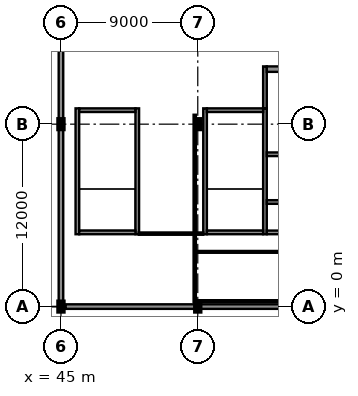
"""IFC4 building model, lengths in metres.
Left out: names, types, materials, properties, quantities, classifications, styles, units other than length and angle.
Written with IfcOpenShell. Run it as: python <this file> out.ifc"""

import sys

from ifc_helpers import new_model, si_unit, direction, frame, frame_2d, origin, origin_2d, place, context, subcontext, project, spatial, rectangle, i_section, extrude, element, fill, save


model = new_model("IFC4")
c1 = context("Model", 3, precision=1e-05, world=origin(), true_north=direction((0.0, 1.0)))
c2 = subcontext(c1, "Body", "Model", "MODEL_VIEW")
j1 = project(units=[si_unit("LENGTHUNIT", "METRE"), si_unit("PLANEANGLEUNIT", "RADIAN")], contexts=[c1])
p1 = place(None, origin())
s1 = spatial("IfcSite", under=j1, at=p1, CompositionType="ELEMENT")
p2 = place(p1, origin())
s2 = spatial("IfcBuilding", under=s1, at=p2, CompositionType="ELEMENT")
p3 = place(p2, frame((0.0, 0.0, 14.4)))
s3 = spatial("IfcBuildingStorey", under=s2, at=p3, CompositionType="ELEMENT", Elevation=14.4)
for number, where, z_axis, x_axis in (
    (1, (45.0, 0.0, 0.0), (0.0, 0.0, 1.0), (0.0, 1.0, 0.0)),
    (2, (45.0, 12.0, 0.0), (0.0, 0.0, 1.0), (1.0, 0.0, 0.0)),
    (3, (54.0, 0.0, 0.0), (0.0, 0.0, 1.0), (1.0, 0.0, 0.0)),
    (4, (54.0, 12.0, 0.0), (0.0, 0.0, 1.0), (1.0, 0.0, 0.0)),
):
    element("IfcColumn", number, at=place(p3, frame(where, z_axis=z_axis, x_axis=x_axis)), inside=s3, PredefinedType="COLUMN", context=c2, shape_type="SweptSolid", body=[
        extrude(i_section(OverallWidth=0.305, OverallDepth=0.62, WebThickness=0.021, FlangeThickness=0.04, at=origin_2d()), origin(), (0.0, 0.0, 1.0), 4.5),
    ])
p4 = place(p3, frame((45.308, 0.0, 0.0), z_axis=(0.0, 0.0, 1.0), x_axis=(1.0, 0.0, 0.0)))
e5 = element("IfcWall", 5, at=p4, inside=s3, PredefinedType="SOLIDWALL", context=c2, shape_type="SweptSolid", body=[
    extrude(rectangle(XDim=8.684, YDim=0.3, at=frame_2d((4.342, 0.0))), origin(), (0.0, 0.0, 1.0), 3.675),
])
p5 = place(p4, frame((1.432, 0.0, 0.85)))
e6 = element("IfcOpeningElement", 6, at=p5, cuts=e5, PredefinedType="OPENING", context=c2, shape_type="SweptSolid", body=[
    extrude(rectangle(XDim=2.0, YDim=2.0, at=frame_2d((1.0, 1.0))), frame((0.0, 0.165, 0.0), z_axis=(0.0, -1.0, 0.0), x_axis=(1.0, 0.0, 0.0)), (0.0, 0.0, 1.0), 0.33),
])
p6 = place(p4, frame((5.252, 0.0, 0.85)))
e7 = element("IfcOpeningElement", 7, at=p6, cuts=e5, PredefinedType="OPENING", context=c2, shape_type="SweptSolid", body=[
    extrude(rectangle(XDim=2.0, YDim=2.0, at=frame_2d((1.0, 1.0))), frame((0.0, 0.165, 0.0), z_axis=(0.0, -1.0, 0.0), x_axis=(1.0, 0.0, 0.0)), (0.0, 0.0, 1.0), 0.33),
])
p7 = place(p3, frame((54.008, 0.0, 0.0), z_axis=(0.0, 0.0, 1.0), x_axis=(1.0, 0.0, 0.0)))
e8 = element("IfcWall", 8, at=p7, inside=s3, PredefinedType="SOLIDWALL", context=c2, shape_type="SweptSolid", body=[
    extrude(rectangle(XDim=8.984, YDim=0.3, at=frame_2d((4.492, 0.0))), origin(), (0.0, 0.0, 1.0), 3.675),
])
p8 = place(p7, frame((1.516, 0.0, 0.85)))
e9 = element("IfcOpeningElement", 9, at=p8, cuts=e8, PredefinedType="OPENING", context=c2, shape_type="SweptSolid", body=[
    extrude(rectangle(XDim=2.0, YDim=2.0, at=frame_2d((1.0, 1.0))), frame((0.0, 0.165, 0.0), z_axis=(0.0, -1.0, 0.0), x_axis=(1.0, 0.0, 0.0)), (0.0, 0.0, 1.0), 0.33),
])
p9 = place(p7, frame((5.468, 0.0, 0.85)))
e10 = element("IfcOpeningElement", 10, at=p9, cuts=e8, PredefinedType="OPENING", context=c2, shape_type="SweptSolid", body=[
    extrude(rectangle(XDim=2.0, YDim=2.0, at=frame_2d((1.0, 1.0))), frame((0.0, 0.165, 0.0), z_axis=(0.0, -1.0, 0.0), x_axis=(1.0, 0.0, 0.0)), (0.0, 0.0, 1.0), 0.33),
])
p10 = place(p3, frame((45.0, 23.644, 0.0), z_axis=(0.0, 0.0, 1.0), x_axis=(0.0, -1.0, 0.0)))
e11 = element("IfcWall", 11, at=p10, inside=s3, PredefinedType="SOLIDWALL", context=c2, shape_type="SweptSolid", body=[
    extrude(rectangle(XDim=11.336, YDim=0.3, at=frame_2d((5.668, 0.0))), origin(), (0.0, 0.0, 1.0), 3.685),
])
p11 = place(p10, frame((5.444, 0.0, 0.0)))
e12 = element("IfcOpeningElement", 12, at=p11, cuts=e11, PredefinedType="OPENING", context=c2, shape_type="SweptSolid", body=[
    extrude(rectangle(XDim=1.4, YDim=2.3, at=frame_2d((0.7, 1.15))), frame((0.0, 0.165, 0.0), z_axis=(0.0, -1.0, 0.0), x_axis=(1.0, 0.0, 0.0)), (0.0, 0.0, 1.0), 0.33),
])
p12 = place(p3, frame((45.0, 11.692, 0.0), z_axis=(0.0, 0.0, 1.0), x_axis=(0.0, -1.0, 0.0)))
e13 = element("IfcWall", 13, at=p12, inside=s3, PredefinedType="SOLIDWALL", context=c2, shape_type="SweptSolid", body=[
    extrude(rectangle(XDim=11.684, YDim=0.3, at=frame_2d((5.842, 0.0))), origin(), (0.0, 0.0, 1.0), 3.685),
])
p13 = place(p12, frame((2.272, 0.0, 0.85)))
e14 = element("IfcOpeningElement", 14, at=p13, cuts=e13, PredefinedType="OPENING", context=c2, shape_type="SweptSolid", body=[
    extrude(rectangle(XDim=2.0, YDim=2.0, at=frame_2d((1.0, 1.0))), frame((0.0, 0.165, 0.0), z_axis=(0.0, -1.0, 0.0), x_axis=(1.0, 0.0, 0.0)), (0.0, 0.0, 1.0), 0.33),
])
p14 = place(p12, frame((7.412, 0.0, 0.85)))
e15 = element("IfcOpeningElement", 15, at=p14, cuts=e13, PredefinedType="OPENING", context=c2, shape_type="SweptSolid", body=[
    extrude(rectangle(XDim=2.0, YDim=2.0, at=frame_2d((1.0, 1.0))), frame((0.0, 0.165, 0.0), z_axis=(0.0, -1.0, 0.0), x_axis=(1.0, 0.0, 0.0)), (0.0, 0.0, 1.0), 0.33),
])
p15 = place(p3, frame((54.48, 4.76, 0.0), z_axis=(0.0, 0.0, 1.0), x_axis=(0.0, 1.0, 0.0)))
e16 = element("IfcWall", 16, at=p15, inside=s3, PredefinedType="SHEAR", context=c2, shape_type="SweptSolid", body=[
    extrude(rectangle(XDim=8.28, YDim=0.24, at=frame_2d((4.14, 0.0))), origin(), (0.0, 0.0, 1.0), 4.31),
])
p16 = place(p3, frame((58.42, 4.76, 0.0), z_axis=(0.0, 0.0, 1.0), x_axis=(0.0, 1.0, 0.0)))
e17 = element("IfcWall", 17, at=p16, inside=s3, PredefinedType="SHEAR", context=c2, shape_type="SweptSolid", body=[
    extrude(rectangle(XDim=8.28, YDim=0.24, at=frame_2d((4.14, 0.0))), origin(), (0.0, 0.0, 1.0), 4.31),
])
p17 = place(p16, frame((6.49, 0.0, 0.0)))
e18 = element("IfcOpeningElement", 18, at=p17, cuts=e17, PredefinedType="OPENING", context=c2, shape_type="SweptSolid", body=[
    extrude(rectangle(XDim=1.3, YDim=2.2, at=frame_2d((0.65, 1.1))), frame((0.0, 0.135, 0.0), z_axis=(0.0, -1.0, 0.0), x_axis=(1.0, 0.0, 0.0)), (0.0, 0.0, 1.0), 0.27),
])
for number, where, z_axis, x_axis in (
    (19, (54.6, 4.88, 0.0), (0.0, 0.0, 1.0), (1.0, 0.0, 0.0)),
    (20, (54.6, 12.92, 0.0), (0.0, 0.0, 1.0), (1.0, 0.0, 0.0)),
):
    element("IfcWall", number, at=place(p3, frame(where, z_axis=z_axis, x_axis=x_axis)), inside=s3, PredefinedType="SHEAR", context=c2, shape_type="SweptSolid", body=[
        extrude(rectangle(XDim=3.7, YDim=0.24, at=frame_2d((1.85, 0.0))), origin(), (0.0, 0.0, 1.0), 4.31),
    ])
p18 = place(p3, frame((46.08, 4.76, 0.0), z_axis=(0.0, 0.0, 1.0), x_axis=(0.0, 1.0, 0.0)))
e21 = element("IfcWall", 21, at=p18, inside=s3, PredefinedType="SHEAR", context=c2, shape_type="SweptSolid", body=[
    extrude(rectangle(XDim=8.28, YDim=0.24, at=frame_2d((4.14, 0.0))), origin(), (0.0, 0.0, 1.0), 4.31),
])
p19 = place(p3, frame((50.02, 4.76, 0.0), z_axis=(0.0, 0.0, 1.0), x_axis=(0.0, 1.0, 0.0)))
e22 = element("IfcWall", 22, at=p19, inside=s3, PredefinedType="SHEAR", context=c2, shape_type="SweptSolid", body=[
    extrude(rectangle(XDim=8.28, YDim=0.24, at=frame_2d((4.14, 0.0))), origin(), (0.0, 0.0, 1.0), 4.31),
])
p20 = place(p19, frame((6.49, 0.0, 0.0)))
e23 = element("IfcOpeningElement", 23, at=p20, cuts=e22, PredefinedType="OPENING", context=c2, shape_type="SweptSolid", body=[
    extrude(rectangle(XDim=1.3, YDim=2.2, at=frame_2d((0.65, 1.1))), frame((0.0, 0.135, 0.0), z_axis=(0.0, -1.0, 0.0), x_axis=(1.0, 0.0, 0.0)), (0.0, 0.0, 1.0), 0.27),
])
for number, where, z_axis, x_axis in (
    (24, (46.2, 4.88, 0.0), (0.0, 0.0, 1.0), (1.0, 0.0, 0.0)),
    (25, (46.2, 12.92, 0.0), (0.0, 0.0, 1.0), (1.0, 0.0, 0.0)),
):
    element("IfcWall", number, at=place(p3, frame(where, z_axis=z_axis, x_axis=x_axis)), inside=s3, PredefinedType="SHEAR", context=c2, shape_type="SweptSolid", body=[
        extrude(rectangle(XDim=3.7, YDim=0.24, at=frame_2d((1.85, 0.0))), origin(), (0.0, 0.0, 1.0), 4.31),
    ])
p21 = place(p3, frame((58.42, 13.04, 0.0), z_axis=(0.0, 0.0, 1.0), x_axis=(0.0, 1.0, 0.0)))
e26 = element("IfcWall", 26, at=p21, inside=s3, PredefinedType="SHEAR", context=c2, shape_type="SweptSolid", body=[
    extrude(rectangle(XDim=2.76, YDim=0.24, at=frame_2d((1.38, 0.0))), origin(), (0.0, 0.0, 1.0), 4.16),
])
p22 = place(p3, frame((58.54, 15.62, 0.0), z_axis=(0.0, 0.0, 1.0), x_axis=(1.0, 0.0, 0.0)))
e27 = element("IfcWall", 27, at=p22, inside=s3, PredefinedType="SHEAR", context=c2, shape_type="SweptSolid", body=[
    extrude(rectangle(XDim=3.9, YDim=0.36, at=frame_2d((1.95, 0.0))), origin(), (0.0, 0.0, 1.0), 4.16),
])
p23 = place(p22, frame((1.15, 0.0, 0.0)))
e28 = element("IfcOpeningElement", 28, at=p23, cuts=e27, PredefinedType="OPENING", context=c2, shape_type="SweptSolid", body=[
    extrude(rectangle(XDim=1.6, YDim=2.25, at=frame_2d((0.8, 1.125))), frame((0.0, 0.195, 0.0), z_axis=(0.0, -1.0, 0.0), x_axis=(1.0, 0.0, 0.0)), (0.0, 0.0, 1.0), 0.39),
])
p24 = place(p3, frame((58.54, 10.02, 0.0), z_axis=(0.0, 0.0, 1.0), x_axis=(1.0, 0.0, 0.0)))
e29 = element("IfcWall", 29, at=p24, inside=s3, PredefinedType="SHEAR", context=c2, shape_type="SweptSolid", body=[
    extrude(rectangle(XDim=3.9, YDim=0.24, at=frame_2d((1.95, 0.0))), origin(), (0.0, 0.0, 1.0), 4.31),
])
p25 = place(p24, frame((0.235, 0.0, 0.0)))
e30 = element("IfcOpeningElement", 30, at=p25, cuts=e29, PredefinedType="OPENING", context=c2, shape_type="SweptSolid", body=[
    extrude(rectangle(XDim=1.6, YDim=2.3, at=frame_2d((0.8, 1.15))), frame((0.0, 0.135, 0.0), z_axis=(0.0, -1.0, 0.0), x_axis=(1.0, 0.0, 0.0)), (0.0, 0.0, 1.0), 0.27),
])
p26 = place(p24, frame((2.185, 0.0, 0.0)))
e31 = element("IfcOpeningElement", 31, at=p26, cuts=e29, PredefinedType="OPENING", context=c2, shape_type="SweptSolid", body=[
    extrude(rectangle(XDim=1.6, YDim=2.3, at=frame_2d((0.8, 1.15))), frame((0.0, 0.135, 0.0), z_axis=(0.0, -1.0, 0.0), x_axis=(1.0, 0.0, 0.0)), (0.0, 0.0, 1.0), 0.27),
])
p27 = place(p3, frame((58.54, 6.88, 0.0), z_axis=(0.0, 0.0, 1.0), x_axis=(1.0, 0.0, 0.0)))
e32 = element("IfcWall", 32, at=p27, inside=s3, PredefinedType="SHEAR", context=c2, shape_type="SweptSolid", body=[
    extrude(rectangle(XDim=3.9, YDim=0.24, at=frame_2d((1.95, 0.0))), origin(), (0.0, 0.0, 1.0), 4.31),
])
p28 = place(p3, frame((58.54, 4.88, 0.0), z_axis=(0.0, 0.0, 1.0), x_axis=(1.0, 0.0, 0.0)))
e33 = element("IfcWall", 33, at=p28, inside=s3, PredefinedType="SHEAR", context=c2, shape_type="SweptSolid", body=[
    extrude(rectangle(XDim=2.26, YDim=0.24, at=frame_2d((1.13, 0.0))), origin(), (0.0, 0.0, 1.0), 4.31),
])
p29 = place(p3, frame((50.113, 4.8, 0.0), z_axis=(0.0, 0.0, 1.0), x_axis=(1.0, 0.0, 0.0)))
e34 = element("IfcWall", 34, at=p29, inside=s3, PredefinedType="PARTITIONING", context=c2, shape_type="SweptSolid", body=[
    extrude(rectangle(XDim=4.252, YDim=0.15, at=frame_2d((2.126, 0.0))), origin(), (0.0, 0.0, 1.0), 4.14),
])
p30 = place(p3, frame((53.8, 4.73, 0.0), z_axis=(0.0, 0.0, 1.0), x_axis=(0.0, -1.0, 0.0)))
e35 = element("IfcWall", 35, at=p30, inside=s3, PredefinedType="PARTITIONING", context=c2, shape_type="SweptSolid", body=[
    extrude(rectangle(XDim=4.422, YDim=0.15, at=frame_2d((2.211, 0.0))), origin(), (0.0, 0.0, 1.0), 3.625),
])
p31 = place(p30, frame((1.686, 0.0, 0.0)))
e36 = element("IfcOpeningElement", 36, at=p31, cuts=e35, PredefinedType="OPENING", context=c2, shape_type="SweptSolid", body=[
    extrude(rectangle(XDim=1.05, YDim=2.25, at=frame_2d((0.525, 1.125))), frame((0.0, 0.09, 0.0), z_axis=(0.0, -1.0, 0.0), x_axis=(1.0, 0.0, 0.0)), (0.0, 0.0, 1.0), 0.18),
])
p32 = place(p3, frame((71.92, 0.36, 0.0), z_axis=(0.0, 0.0, 1.0), x_axis=(-1.0, 0.0, 0.0)))
e37 = element("IfcWall", 37, at=p32, inside=s3, PredefinedType="PARTITIONING", context=c2, shape_type="SweptSolid", body=[
    extrude(rectangle(XDim=18.112, YDim=0.12, at=frame_2d((9.056, 0.0))), origin(), (0.0, 0.0, 1.0), 4.14),
])
p33 = place(p3, frame((53.87, 3.6, 0.0), z_axis=(0.0, 0.0, 1.0), x_axis=(1.0, 0.0, 0.0)))
e38 = element("IfcWall", 38, at=p33, inside=s3, PredefinedType="PARTITIONING", context=c2, shape_type="SweptSolid", body=[
    extrude(rectangle(XDim=63.25, YDim=0.12, at=frame_2d((31.625, 0.0))), origin(), (0.0, 0.0, 1.0), 4.14),
])
p34 = place(p33, frame((19.855, 0.0, 0.0)))
e39 = element("IfcOpeningElement", 39, at=p34, cuts=e38, PredefinedType="OPENING", context=c2, shape_type="SweptSolid", body=[
    extrude(rectangle(XDim=0.95, YDim=2.15, at=frame_2d((0.475, 1.075))), frame((0.0, 0.075, 0.0), z_axis=(0.0, -1.0, 0.0), x_axis=(1.0, 0.0, 0.0)), (0.0, 0.0, 1.0), 0.15),
])
p35 = place(p3, frame((53.8, 12.62, 0.0), z_axis=(0.0, 0.0, 1.0), x_axis=(0.0, -1.0, 0.0)))
e40 = element("IfcWall", 40, at=p35, inside=s3, PredefinedType="PARTITIONING", context=c2, shape_type="SweptSolid", body=[
    extrude(rectangle(XDim=7.75, YDim=0.15, at=frame_2d((3.875, 0.0))), origin(), (0.0, 0.0, 1.0), 3.625),
])
p36 = place(p5, origin())
e41 = element("IfcWindow", 41, at=p36, inside=s3, PartitioningType="SINGLE_PANEL", PredefinedType="WINDOW", context=c2, shape_type="SweptSolid", body=[
    extrude(rectangle(XDim=2.0, YDim=2.0, at=frame_2d((1.0, 1.0))), frame((0.0, 0.03, 0.0), z_axis=(0.0, -1.0, 0.0), x_axis=(1.0, 0.0, 0.0)), (0.0, 0.0, 1.0), 0.06),
])
fill(e6, e41)
p37 = place(p6, origin())
e42 = element("IfcWindow", 42, at=p37, inside=s3, PartitioningType="SINGLE_PANEL", PredefinedType="WINDOW", context=c2, shape_type="SweptSolid", body=[
    extrude(rectangle(XDim=2.0, YDim=2.0, at=frame_2d((1.0, 1.0))), frame((0.0, 0.03, 0.0), z_axis=(0.0, -1.0, 0.0), x_axis=(1.0, 0.0, 0.0)), (0.0, 0.0, 1.0), 0.06),
])
fill(e7, e42)
p38 = place(p8, origin())
e43 = element("IfcWindow", 43, at=p38, inside=s3, PartitioningType="SINGLE_PANEL", PredefinedType="WINDOW", context=c2, shape_type="SweptSolid", body=[
    extrude(rectangle(XDim=2.0, YDim=2.0, at=frame_2d((1.0, 1.0))), frame((0.0, 0.03, 0.0), z_axis=(0.0, -1.0, 0.0), x_axis=(1.0, 0.0, 0.0)), (0.0, 0.0, 1.0), 0.06),
])
fill(e9, e43)
p39 = place(p13, origin())
e44 = element("IfcWindow", 44, at=p39, inside=s3, PartitioningType="SINGLE_PANEL", PredefinedType="WINDOW", context=c2, shape_type="SweptSolid", body=[
    extrude(rectangle(XDim=2.0, YDim=2.0, at=frame_2d((1.0, 1.0))), frame((0.0, 0.03, 0.0), z_axis=(0.0, -1.0, 0.0), x_axis=(1.0, 0.0, 0.0)), (0.0, 0.0, 1.0), 0.06),
])
fill(e14, e44)
p40 = place(p14, origin())
e45 = element("IfcWindow", 45, at=p40, inside=s3, PartitioningType="SINGLE_PANEL", PredefinedType="WINDOW", context=c2, shape_type="SweptSolid", body=[
    extrude(rectangle(XDim=2.0, YDim=2.0, at=frame_2d((1.0, 1.0))), frame((0.0, 0.03, 0.0), z_axis=(0.0, -1.0, 0.0), x_axis=(1.0, 0.0, 0.0)), (0.0, 0.0, 1.0), 0.06),
])
fill(e15, e45)
p41 = place(p17, frame((1.3, 0.0, 0.0), z_axis=(0.0, 0.0, 1.0), x_axis=(-1.0, 0.0, 0.0)))
e46 = element("IfcDoor", 46, at=p41, inside=s3, OperationType="SINGLE_SWING_LEFT", PredefinedType="DOOR", context=c2, shape_type="SweptSolid", body=[
    extrude(rectangle(XDim=1.3, YDim=2.2, at=frame_2d((0.65, 1.1))), frame((0.0, 0.025, 0.0), z_axis=(0.0, -1.0, 0.0), x_axis=(1.0, 0.0, 0.0)), (0.0, 0.0, 1.0), 0.05),
])
fill(e18, e46)
p42 = place(p20, frame((1.3, 0.0, 0.0), z_axis=(0.0, 0.0, 1.0), x_axis=(-1.0, 0.0, 0.0)))
e47 = element("IfcDoor", 47, at=p42, inside=s3, OperationType="SINGLE_SWING_LEFT", PredefinedType="DOOR", context=c2, shape_type="SweptSolid", body=[
    extrude(rectangle(XDim=1.3, YDim=2.2, at=frame_2d((0.65, 1.1))), frame((0.0, 0.025, 0.0), z_axis=(0.0, -1.0, 0.0), x_axis=(1.0, 0.0, 0.0)), (0.0, 0.0, 1.0), 0.05),
])
fill(e23, e47)
p43 = place(p25, origin())
e48 = element("IfcDoor", 48, at=p43, inside=s3, OperationType="DOUBLE_DOOR_SLIDING", PredefinedType="DOOR", context=c2, shape_type="SweptSolid", body=[
    extrude(rectangle(XDim=1.6, YDim=2.3, at=frame_2d((0.8, 1.15))), frame((0.0, 0.025, 0.0), z_axis=(0.0, -1.0, 0.0), x_axis=(1.0, 0.0, 0.0)), (0.0, 0.0, 1.0), 0.05),
])
fill(e30, e48)
p44 = place(p31, frame((1.05, 0.0, 0.0), z_axis=(0.0, 0.0, 1.0), x_axis=(-1.0, 0.0, 0.0)))
e49 = element("IfcDoor", 49, at=p44, inside=s3, OperationType="SINGLE_SWING_RIGHT", PredefinedType="DOOR", context=c2, shape_type="SweptSolid", body=[
    extrude(rectangle(XDim=1.05, YDim=2.25, at=frame_2d((0.525, 1.125))), frame((0.0, 0.025, 0.0), z_axis=(0.0, -1.0, 0.0), x_axis=(1.0, 0.0, 0.0)), (0.0, 0.0, 1.0), 0.05),
])
fill(e36, e49)
save(model, sys.argv[1])
